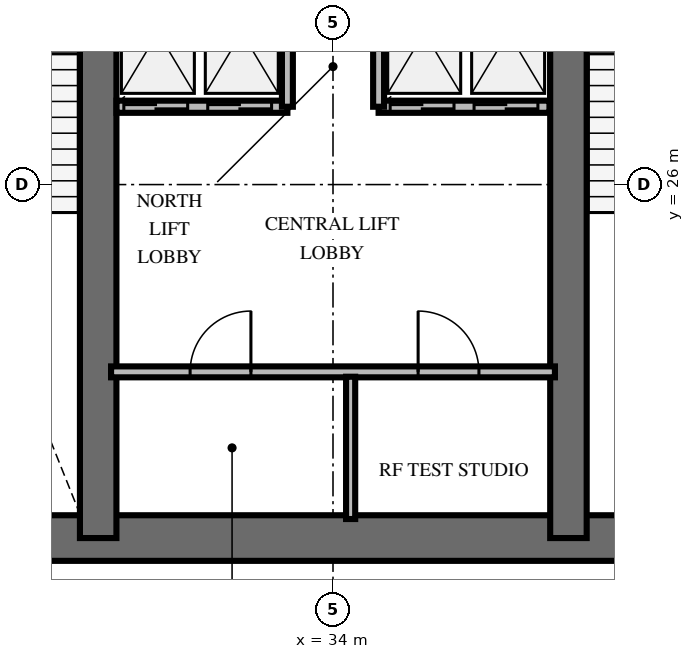
"""IFC4 building model, lengths in metres.
Left out: names, types, materials, properties, quantities, classifications, styles, units other than length and angle.
Written with IfcOpenShell. Run it as: python <this file> out.ifc"""

import sys

from ifc_helpers import new_model, si_unit, direction, frame, frame_2d, origin, place, context, subcontext, project, spatial, rectangle, extrude, element, fill, save


model = new_model("IFC4")
c1 = context("Model", 3, precision=1e-05, world=origin(), true_north=direction((0.0, 1.0)))
c2 = subcontext(c1, "Body", "Model", "MODEL_VIEW")
j1 = project(units=[si_unit("LENGTHUNIT", "METRE"), si_unit("PLANEANGLEUNIT", "RADIAN")], contexts=[c1])
p1 = place(None, origin())
s1 = spatial("IfcSite", under=j1, at=p1, CompositionType="ELEMENT")
p2 = place(p1, origin())
s2 = spatial("IfcBuilding", under=s1, at=p2, CompositionType="ELEMENT")
p3 = place(p2, frame((0.0, 0.0, 191.6)))
s3 = spatial("IfcBuildingStorey", under=s2, at=p3, CompositionType="ELEMENT", Elevation=191.6)
p4 = place(p3, frame((26.072, 20.187, 0.0), z_axis=(0.0, 0.0, 1.0), x_axis=(1.0, 0.0, 0.0)))
e1 = element("IfcWall", 1, at=p4, inside=s3, PredefinedType="SHEAR", context=c2, shape_type="SweptSolid", body=[
    extrude(rectangle(XDim=15.866, YDim=0.75, at=frame_2d((7.933, 0.0))), origin(), (0.0, 0.0, 1.0), 3.6),
])
for number, where, z_axis, x_axis in (
    (2, (30.138, 20.187, 0.0), (0.0, 0.0, 1.0), (0.0, 1.0, 0.0)),
    (3, (37.872, 20.187, 0.0), (0.0, 0.0, 1.0), (0.0, 1.0, 0.0)),
):
    element("IfcWall", number, at=place(p3, frame(where, z_axis=z_axis, x_axis=x_axis)), inside=s3, PredefinedType="SHEAR", context=c2, shape_type="SweptSolid", body=[
        extrude(rectangle(XDim=9.826, YDim=0.6, at=frame_2d((4.913, 0.0))), origin(), (0.0, 0.0, 1.0), 3.6),
    ])
p5 = place(p3, frame((30.35, 22.92, 0.0), z_axis=(0.0, 0.0, 1.0), x_axis=(1.0, 0.0, 0.0)))
e4 = element("IfcWall", 4, at=p5, inside=s3, PredefinedType="PARTITIONING", context=c2, shape_type="SweptSolid", body=[
    extrude(rectangle(XDim=7.3, YDim=0.18, at=frame_2d((3.65, 0.0))), origin(), (0.0, 0.0, 1.0), 2.46),
])
p6 = place(p5, frame((1.3, 0.0, 0.0)))
e5 = element("IfcOpeningElement", 5, at=p6, cuts=e4, PredefinedType="OPENING", context=c2, shape_type="SweptSolid", body=[
    extrude(rectangle(XDim=1.0, YDim=2.15, at=frame_2d((0.5, 1.075))), frame((0.0, 0.1, 0.0), z_axis=(0.0, -1.0, 0.0), x_axis=(1.0, 0.0, 0.0)), (0.0, 0.0, 1.0), 0.2),
])
p7 = place(p5, frame((5.05, 0.0, 0.0)))
e6 = element("IfcOpeningElement", 6, at=p7, cuts=e4, PredefinedType="OPENING", context=c2, shape_type="SweptSolid", body=[
    extrude(rectangle(XDim=1.0, YDim=2.15, at=frame_2d((0.5, 1.075))), frame((0.0, 0.1, 0.0), z_axis=(0.0, -1.0, 0.0), x_axis=(1.0, 0.0, 0.0)), (0.0, 0.0, 1.0), 0.2),
])
p8 = place(p3, frame((34.29, 20.5, 0.0), z_axis=(0.0, 0.0, 1.0), x_axis=(0.0, 1.0, 0.0)))
e7 = element("IfcWall", 7, at=p8, inside=s3, PredefinedType="PARTITIONING", context=c2, shape_type="SweptSolid", body=[
    extrude(rectangle(XDim=2.34, YDim=0.15, at=frame_2d((1.17, 0.0))), origin(), (0.0, 0.0, 1.0), 2.46),
])
p9 = place(p3, frame((30.44, 27.28, 0.0), z_axis=(0.0, 0.0, 1.0), x_axis=(1.0, 0.0, 0.0)))
e8 = element("IfcWall", 8, at=p9, inside=s3, PredefinedType="SOLIDWALL", context=c2, shape_type="SweptSolid", body=[
    extrude(rectangle(XDim=2.81, YDim=0.2, at=frame_2d((1.405, 0.0))), origin(), (0.0, 0.0, 1.0), 2.46),
])
p10 = place(p9, frame((0.12, 0.0, 0.0)))
e9 = element("IfcOpeningElement", 9, at=p10, cuts=e8, PredefinedType="OPENING", context=c2, shape_type="SweptSolid", body=[
    extrude(rectangle(XDim=1.05, YDim=2.1, at=frame_2d((0.525, 1.05))), frame((0.0, 0.11, 0.0), z_axis=(0.0, -1.0, 0.0), x_axis=(1.0, 0.0, 0.0)), (0.0, 0.0, 1.0), 0.22),
])
p11 = place(p9, frame((1.5, 0.0, 0.0)))
e10 = element("IfcOpeningElement", 10, at=p11, cuts=e8, PredefinedType="OPENING", context=c2, shape_type="SweptSolid", body=[
    extrude(rectangle(XDim=1.05, YDim=2.1, at=frame_2d((0.525, 1.05))), frame((0.0, 0.11, 0.0), z_axis=(0.0, -1.0, 0.0), x_axis=(1.0, 0.0, 0.0)), (0.0, 0.0, 1.0), 0.22),
])
p12 = place(p3, frame((33.25, 27.28, 0.0), z_axis=(0.0, 0.0, 1.0), x_axis=(0.0, 1.0, 0.0)))
e11 = element("IfcWall", 11, at=p12, inside=s3, PredefinedType="SOLIDWALL", context=c2, shape_type="SweptSolid", body=[
    extrude(rectangle(XDim=2.47, YDim=0.18, at=frame_2d((1.235, 0.0))), origin(), (0.0, 0.0, 1.0), 2.46),
])
p13 = place(p3, frame((34.75, 27.28, 0.0), z_axis=(0.0, 0.0, 1.0), x_axis=(1.0, 0.0, 0.0)))
e12 = element("IfcWall", 12, at=p13, inside=s3, PredefinedType="SOLIDWALL", context=c2, shape_type="SweptSolid", body=[
    extrude(rectangle(XDim=2.81, YDim=0.2, at=frame_2d((1.405, 0.0))), origin(), (0.0, 0.0, 1.0), 2.46),
])
p14 = place(p13, frame((0.19, 0.0, 0.0)))
e13 = element("IfcOpeningElement", 13, at=p14, cuts=e12, PredefinedType="OPENING", context=c2, shape_type="SweptSolid", body=[
    extrude(rectangle(XDim=1.05, YDim=2.1, at=frame_2d((0.525, 1.05))), frame((0.0, 0.11, 0.0), z_axis=(0.0, -1.0, 0.0), x_axis=(1.0, 0.0, 0.0)), (0.0, 0.0, 1.0), 0.22),
])
p15 = place(p13, frame((1.57, 0.0, 0.0)))
e14 = element("IfcOpeningElement", 14, at=p15, cuts=e12, PredefinedType="OPENING", context=c2, shape_type="SweptSolid", body=[
    extrude(rectangle(XDim=1.05, YDim=2.1, at=frame_2d((0.525, 1.05))), frame((0.0, 0.11, 0.0), z_axis=(0.0, -1.0, 0.0), x_axis=(1.0, 0.0, 0.0)), (0.0, 0.0, 1.0), 0.22),
])
p16 = place(p3, frame((34.75, 27.28, 0.0), z_axis=(0.0, 0.0, 1.0), x_axis=(0.0, 1.0, 0.0)))
e15 = element("IfcWall", 15, at=p16, inside=s3, PredefinedType="SOLIDWALL", context=c2, shape_type="SweptSolid", body=[
    extrude(rectangle(XDim=2.47, YDim=0.18, at=frame_2d((1.235, 0.0))), origin(), (0.0, 0.0, 1.0), 2.46),
])
p17 = place(p6, origin())
e16 = element("IfcDoor", 16, at=p17, inside=s3, OperationType="SINGLE_SWING_RIGHT", PredefinedType="DOOR", context=c2, shape_type="SweptSolid", body=[
    extrude(rectangle(XDim=1.0, YDim=2.15, at=frame_2d((0.5, 1.075))), frame((0.0, 0.025, 0.0), z_axis=(0.0, -1.0, 0.0), x_axis=(1.0, 0.0, 0.0)), (0.0, 0.0, 1.0), 0.05),
])
fill(e5, e16)
p18 = place(p7, origin())
e17 = element("IfcDoor", 17, at=p18, inside=s3, OperationType="SINGLE_SWING_LEFT", PredefinedType="DOOR", context=c2, shape_type="SweptSolid", body=[
    extrude(rectangle(XDim=1.0, YDim=2.15, at=frame_2d((0.5, 1.075))), frame((0.0, 0.025, 0.0), z_axis=(0.0, -1.0, 0.0), x_axis=(1.0, 0.0, 0.0)), (0.0, 0.0, 1.0), 0.05),
])
fill(e6, e17)
p19 = place(p10, origin())
e18 = element("IfcDoor", 18, at=p19, inside=s3, OperationType="DOUBLE_DOOR_SLIDING", PredefinedType="USERDEFINED", context=c2, shape_type="SweptSolid", body=[
    extrude(rectangle(XDim=1.05, YDim=2.1, at=frame_2d((0.525, 1.05))), frame((0.0, 0.025, 0.0), z_axis=(0.0, -1.0, 0.0), x_axis=(1.0, 0.0, 0.0)), (0.0, 0.0, 1.0), 0.05),
])
fill(e9, e18)
p20 = place(p11, origin())
e19 = element("IfcDoor", 19, at=p20, inside=s3, OperationType="DOUBLE_DOOR_SLIDING", PredefinedType="USERDEFINED", context=c2, shape_type="SweptSolid", body=[
    extrude(rectangle(XDim=1.05, YDim=2.1, at=frame_2d((0.525, 1.05))), frame((0.0, 0.025, 0.0), z_axis=(0.0, -1.0, 0.0), x_axis=(1.0, 0.0, 0.0)), (0.0, 0.0, 1.0), 0.05),
])
fill(e10, e19)
p21 = place(p14, origin())
e20 = element("IfcDoor", 20, at=p21, inside=s3, OperationType="DOUBLE_DOOR_SLIDING", PredefinedType="USERDEFINED", context=c2, shape_type="SweptSolid", body=[
    extrude(rectangle(XDim=1.05, YDim=2.1, at=frame_2d((0.525, 1.05))), frame((0.0, 0.025, 0.0), z_axis=(0.0, -1.0, 0.0), x_axis=(1.0, 0.0, 0.0)), (0.0, 0.0, 1.0), 0.05),
])
fill(e13, e20)
p22 = place(p15, origin())
e21 = element("IfcDoor", 21, at=p22, inside=s3, OperationType="DOUBLE_DOOR_SLIDING", PredefinedType="USERDEFINED", context=c2, shape_type="SweptSolid", body=[
    extrude(rectangle(XDim=1.05, YDim=2.1, at=frame_2d((0.525, 1.05))), frame((0.0, 0.025, 0.0), z_axis=(0.0, -1.0, 0.0), x_axis=(1.0, 0.0, 0.0)), (0.0, 0.0, 1.0), 0.05),
])
fill(e14, e21)
save(model, sys.argv[1])
